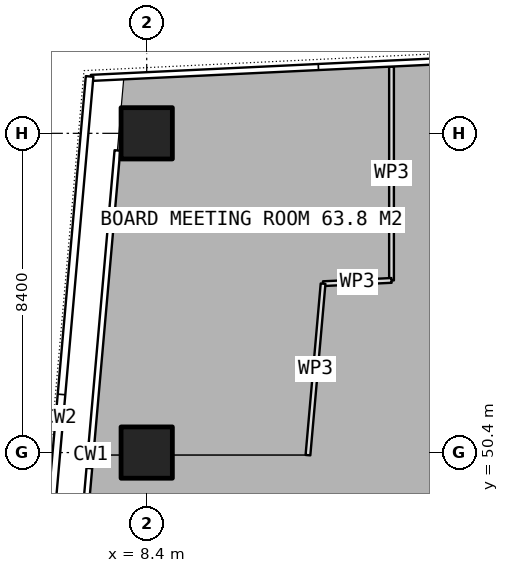
"""IFC4 building model, lengths in metres.
Left out: names, types, materials, properties, quantities, classifications, styles, units other than length and angle.
Written with IfcOpenShell. Run it as: python <this file> out.ifc"""

import sys

from ifc_helpers import new_model, si_unit, direction, frame, frame_2d, origin, origin_2d, place, context, subcontext, project, spatial, rectangle, extrude, element, save


model = new_model("IFC4")
c1 = context("Model", 3, precision=1e-05, world=origin(), true_north=direction((0.0, 1.0)))
c2 = subcontext(c1, "Body", "Model", "MODEL_VIEW")
j1 = project(units=[si_unit("LENGTHUNIT", "METRE"), si_unit("PLANEANGLEUNIT", "RADIAN")], contexts=[c1])
p1 = place(None, origin())
s1 = spatial("IfcSite", under=j1, at=p1, CompositionType="ELEMENT")
p2 = place(p1, origin())
s2 = spatial("IfcBuilding", under=s1, at=p2, CompositionType="ELEMENT")
p3 = place(p2, frame((0.0, 0.0, 210.2)))
s3 = spatial("IfcBuildingStorey", under=s2, at=p3, CompositionType="ELEMENT", Elevation=210.2)
for number, where, z_axis, x_axis in (
    (1, (8.4, 50.4, 0.0), (0.0, 0.0, 1.0), (1.0, 0.0, 0.0)),
    (2, (8.4, 58.8, 0.0), (0.0, 0.0, 1.0), (1.0, 0.0, 0.0)),
):
    element("IfcColumn", number, at=place(p3, frame(where, z_axis=z_axis, x_axis=x_axis)), inside=s3, PredefinedType="COLUMN", context=c2, shape_type="SweptSolid", body=[
        extrude(rectangle(XDim=1.35, YDim=1.35, at=origin_2d()), origin(), (0.0, 0.0, 1.0), 3.75),
    ])
p4 = place(p3, frame((14.842, 60.557, 0.0), z_axis=(0.0, 0.0, 1.0), x_axis=(0.0, -1.0, 0.0)))
e3 = element("IfcWall", 3, at=p4, inside=s3, PredefinedType="PARTITIONING", context=c2, shape_type="SweptSolid", body=[
    extrude(rectangle(XDim=5.627, YDim=0.125, at=frame_2d((2.813, 0.0))), origin(), (0.0, 0.0, 1.0), 3.5),
])
p5 = place(p3, frame((14.842, 54.93, 0.0), z_axis=(0.0, 0.0, 1.0), x_axis=(-0.998863537959, -0.047661646382, 0.0)))
e4 = element("IfcWall", 4, at=p5, inside=s3, PredefinedType="PARTITIONING", context=c2, shape_type="SweptSolid", body=[
    extrude(rectangle(XDim=1.803, YDim=0.125, at=frame_2d((0.901, 0.0))), origin(), (0.0, 0.0, 1.0), 3.5),
])
p6 = place(p3, frame((13.041, 54.844, 0.0), z_axis=(0.0, 0.0, 1.0), x_axis=(-0.087857629893, -0.996133041752, 0.0)))
e5 = element("IfcWall", 5, at=p6, inside=s3, PredefinedType="PARTITIONING", context=c2, shape_type="SweptSolid", body=[
    extrude(rectangle(XDim=4.53, YDim=0.125, at=frame_2d((2.265, 0.0))), origin(), (0.0, 0.0, 1.0), 3.5),
])
save(model, sys.argv[1])
